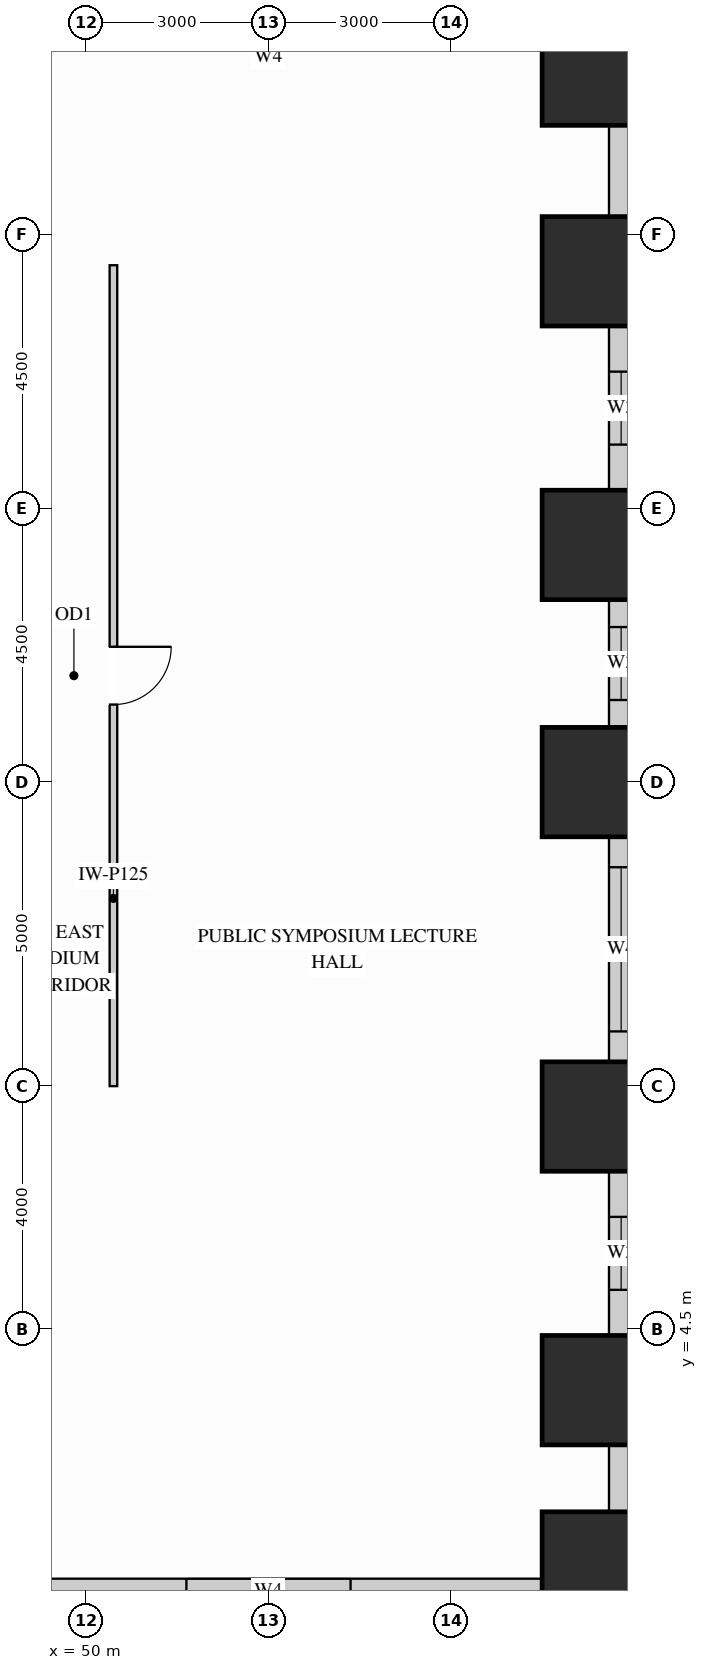
"""IFC4 building model, lengths in metres.
Left out: names, types, materials, properties, quantities, classifications, styles, units other than length and angle.
Written with IfcOpenShell. Run it as: python <this file> out.ifc"""

import sys

from ifc_helpers import new_model, si_unit, direction, frame, frame_2d, origin, origin_2d, place, context, subcontext, project, spatial, rectangle, extrude, source, transform, mapped, element, fill, save


model = new_model("IFC4")
c1 = context("Model", 3, precision=1e-05, world=origin(), true_north=direction((0.0, 1.0)))
c2 = subcontext(c1, "Body", "Model", "MODEL_VIEW")
j1 = project(units=[si_unit("LENGTHUNIT", "METRE"), si_unit("PLANEANGLEUNIT", "RADIAN")], contexts=[c1])
p1 = place(None, origin())
s1 = spatial("IfcSite", under=j1, at=p1, CompositionType="ELEMENT")
p2 = place(p1, origin())
s2 = spatial("IfcBuilding", under=s1, at=p2, CompositionType="ELEMENT")
p3 = place(p2, frame((0.0, 0.0, 4.5)))
s3 = spatial("IfcBuildingStorey", under=s2, at=p3, CompositionType="ELEMENT", Elevation=4.5)
m1 = source(origin(), c2, "Body", "SweptSolid", [
    extrude(rectangle(XDim=1.8, YDim=1.8, at=origin_2d()), origin(), (0.0, 0.0, 1.0), 4.25),
])
for number, where, z_axis, x_axis in (
    (1, (58.4, 0.6, 0.0), (0.0, 0.0, 1.0), (1.0, 0.0, 0.0)),
    (2, (58.4, 3.5, 0.0), (0.0, 0.0, 1.0), (1.0, 0.0, 0.0)),
    (3, (58.4, 8.0, 0.0), (0.0, 0.0, 1.0), (1.0, 0.0, 0.0)),
    (4, (58.4, 13.5, 0.0), (0.0, 0.0, 1.0), (1.0, 0.0, 0.0)),
    (5, (58.4, 17.4, 0.0), (0.0, 0.0, 1.0), (1.0, 0.0, 0.0)),
    (6, (58.4, 21.9, 0.0), (0.0, 0.0, 1.0), (1.0, 0.0, 0.0)),
    (7, (58.4, 25.2, 0.0), (0.0, 0.0, 1.0), (1.0, 0.0, 0.0)),
):
    element("IfcColumn", number, at=place(p3, frame(where, z_axis=z_axis, x_axis=x_axis)), inside=s3, PredefinedType="COLUMN", context=c2, shape_type="MappedRepresentation", body=[
        mapped(m1, transform((0.0, 0.0, 0.0), x_axis=(1.0, 0.0, 0.0), y_axis=(0.0, 1.0, 0.0), z_axis=(0.0, 0.0, 1.0))),
    ])
p4 = place(p3, frame((48.498, 0.2, 0.0), z_axis=(0.0, 0.0, 1.0), x_axis=(1.0, 0.0, 0.0)))
e8 = element("IfcWall", 8, at=p4, inside=s3, PredefinedType="SOLIDWALL", context=c2, shape_type="SweptSolid", body=[
    extrude(rectangle(XDim=9.004, YDim=0.4, at=frame_2d((4.502, 0.0))), origin(), (0.0, 0.0, 1.0), 3.135),
])
p5 = place(p4, frame((3.152, 0.0, 0.65)))
e9 = element("IfcOpeningElement", 9, at=p5, cuts=e8, PredefinedType="OPENING", context=c2, shape_type="SweptSolid", body=[
    extrude(rectangle(XDim=2.7, YDim=2.305, at=frame_2d((1.35, 1.152))), frame((0.0, 0.21, 0.0), z_axis=(0.0, -1.0, 0.0), x_axis=(1.0, 0.0, 0.0)), (0.0, 0.0, 1.0), 0.42),
])
m2 = source(origin(), c2, "Body", "SweptSolid", [
    extrude(rectangle(XDim=1.104, YDim=0.4, at=frame_2d((0.552, 0.0))), origin(), (0.0, 0.0, 1.0), 3.135),
])
p6 = place(p3, frame((58.8, 1.498, 0.0), z_axis=(0.0, 0.0, 1.0), x_axis=(0.0, 1.0, 0.0)))
e10 = element("IfcWall", 10, at=p6, inside=s3, PredefinedType="SOLIDWALL", context=c2, shape_type="MappedRepresentation", body=[
    mapped(m2, transform((0.0, 0.0, 0.0), x_axis=(1.0, 0.0, 0.0), y_axis=(0.0, 1.0, 0.0), z_axis=(0.0, 0.0, 1.0))),
])
p7 = place(p3, frame((58.8, 4.398, 0.0), z_axis=(0.0, 0.0, 1.0), x_axis=(0.0, 1.0, 0.0)))
e11 = element("IfcWall", 11, at=p7, inside=s3, PredefinedType="SOLIDWALL", context=c2, shape_type="SweptSolid", body=[
    extrude(rectangle(XDim=2.704, YDim=0.4, at=frame_2d((1.352, 0.0))), origin(), (0.0, 0.0, 1.0), 3.135),
])
p8 = place(p7, frame((0.752, 0.0, 0.65)))
e12 = element("IfcOpeningElement", 12, at=p8, cuts=e11, PredefinedType="OPENING", context=c2, shape_type="SweptSolid", body=[
    extrude(rectangle(XDim=1.2, YDim=2.305, at=frame_2d((0.6, 1.152))), frame((0.0, 0.21, 0.0), z_axis=(0.0, -1.0, 0.0), x_axis=(1.0, 0.0, 0.0)), (0.0, 0.0, 1.0), 0.42),
])
p9 = place(p3, frame((58.8, 8.898, 0.0), z_axis=(0.0, 0.0, 1.0), x_axis=(0.0, 1.0, 0.0)))
e13 = element("IfcWall", 13, at=p9, inside=s3, PredefinedType="SOLIDWALL", context=c2, shape_type="SweptSolid", body=[
    extrude(rectangle(XDim=3.704, YDim=0.4, at=frame_2d((1.852, 0.0))), origin(), (0.0, 0.0, 1.0), 3.135),
])
p10 = place(p9, frame((0.502, 0.0, 0.65)))
e14 = element("IfcOpeningElement", 14, at=p10, cuts=e13, PredefinedType="OPENING", context=c2, shape_type="SweptSolid", body=[
    extrude(rectangle(XDim=2.7, YDim=2.305, at=frame_2d((1.35, 1.152))), frame((0.0, 0.21, 0.0), z_axis=(0.0, -1.0, 0.0), x_axis=(1.0, 0.0, 0.0)), (0.0, 0.0, 1.0), 0.42),
])
p11 = place(p3, frame((58.8, 14.398, 0.0), z_axis=(0.0, 0.0, 1.0), x_axis=(0.0, 1.0, 0.0)))
e15 = element("IfcWall", 15, at=p11, inside=s3, PredefinedType="SOLIDWALL", context=c2, shape_type="SweptSolid", body=[
    extrude(rectangle(XDim=2.104, YDim=0.4, at=frame_2d((1.052, 0.0))), origin(), (0.0, 0.0, 1.0), 3.135),
])
p12 = place(p11, frame((0.452, 0.0, 0.65)))
e16 = element("IfcOpeningElement", 16, at=p12, cuts=e15, PredefinedType="OPENING", context=c2, shape_type="SweptSolid", body=[
    extrude(rectangle(XDim=1.2, YDim=2.305, at=frame_2d((0.6, 1.152))), frame((0.0, 0.21, 0.0), z_axis=(0.0, -1.0, 0.0), x_axis=(1.0, 0.0, 0.0)), (0.0, 0.0, 1.0), 0.42),
])
p13 = place(p3, frame((58.8, 18.298, 0.0), z_axis=(0.0, 0.0, 1.0), x_axis=(0.0, 1.0, 0.0)))
e17 = element("IfcWall", 17, at=p13, inside=s3, PredefinedType="SOLIDWALL", context=c2, shape_type="SweptSolid", body=[
    extrude(rectangle(XDim=2.704, YDim=0.4, at=frame_2d((1.352, 0.0))), origin(), (0.0, 0.0, 1.0), 3.135),
])
p14 = place(p13, frame((0.752, 0.0, 0.65)))
e18 = element("IfcOpeningElement", 18, at=p14, cuts=e17, PredefinedType="OPENING", context=c2, shape_type="SweptSolid", body=[
    extrude(rectangle(XDim=1.2, YDim=2.305, at=frame_2d((0.6, 1.152))), frame((0.0, 0.21, 0.0), z_axis=(0.0, -1.0, 0.0), x_axis=(1.0, 0.0, 0.0)), (0.0, 0.0, 1.0), 0.42),
])
m3 = source(origin(), c2, "Body", "SweptSolid", [
    extrude(rectangle(XDim=1.504, YDim=0.4, at=frame_2d((0.752, 0.0))), origin(), (0.0, 0.0, 1.0), 3.135),
])
p15 = place(p3, frame((58.8, 22.798, 0.0), z_axis=(0.0, 0.0, 1.0), x_axis=(0.0, 1.0, 0.0)))
e19 = element("IfcWall", 19, at=p15, inside=s3, PredefinedType="SOLIDWALL", context=c2, shape_type="MappedRepresentation", body=[
    mapped(m3, transform((0.0, 0.0, 0.0), x_axis=(1.0, 0.0, 0.0), y_axis=(0.0, 1.0, 0.0), z_axis=(0.0, 0.0, 1.0))),
])
p16 = place(p3, frame((50.45, 8.5, 0.0), z_axis=(0.0, 0.0, 1.0), x_axis=(0.0, 1.0, 0.0)))
e20 = element("IfcWall", 20, at=p16, inside=s3, PredefinedType="PARTITIONING", context=c2, shape_type="SweptSolid", body=[
    extrude(rectangle(XDim=13.5, YDim=0.125, at=frame_2d((6.75, 0.0))), origin(), (0.0, 0.0, 1.0), 4.235),
])
p17 = place(p16, frame((6.275, 0.0, 0.0)))
e21 = element("IfcOpeningElement", 21, at=p17, cuts=e20, PredefinedType="OPENING", context=c2, shape_type="SweptSolid", body=[
    extrude(rectangle(XDim=0.95, YDim=2.15, at=frame_2d((0.475, 1.075))), frame((0.0, 0.073, 0.0), z_axis=(0.0, -1.0, 0.0), x_axis=(1.0, 0.0, 0.0)), (0.0, 0.0, 1.0), 0.145),
])
m4 = source(origin(), c2, "Body", "SweptSolid", [
    extrude(rectangle(XDim=0.95, YDim=2.15, at=frame_2d((0.475, 1.075))), frame((0.0, 0.025, 0.0), z_axis=(0.0, -1.0, 0.0), x_axis=(1.0, 0.0, 0.0)), (0.0, 0.0, 1.0), 0.05),
])
p18 = place(p17, origin())
e22 = element("IfcDoor", 22, at=p18, inside=s3, OperationType="SINGLE_SWING_RIGHT", PredefinedType="DOOR", context=c2, shape_type="MappedRepresentation", body=[
    mapped(m4, transform((0.0, 0.0, 0.0), x_axis=(1.0, 0.0, 0.0), y_axis=(0.0, 1.0, 0.0), z_axis=(0.0, 0.0, 1.0))),
])
fill(e21, e22)
m5 = source(origin(), c2, "Body", "SweptSolid", [
    extrude(rectangle(XDim=1.2, YDim=2.305, at=frame_2d((0.6, 1.152))), frame((0.0, 0.03, 0.0), z_axis=(0.0, -1.0, 0.0), x_axis=(1.0, 0.0, 0.0)), (0.0, 0.0, 1.0), 0.06),
])
p19 = place(p8, origin())
e23 = element("IfcWindow", 23, at=p19, inside=s3, PartitioningType="SINGLE_PANEL", PredefinedType="WINDOW", context=c2, shape_type="MappedRepresentation", body=[
    mapped(m5, transform((0.0, 0.0, 0.0), x_axis=(1.0, 0.0, 0.0), y_axis=(0.0, 1.0, 0.0), z_axis=(0.0, 0.0, 1.0))),
])
fill(e12, e23)
p20 = place(p12, origin())
e24 = element("IfcWindow", 24, at=p20, inside=s3, PartitioningType="SINGLE_PANEL", PredefinedType="WINDOW", context=c2, shape_type="MappedRepresentation", body=[
    mapped(m5, transform((0.0, 0.0, 0.0), x_axis=(1.0, 0.0, 0.0), y_axis=(0.0, 1.0, 0.0), z_axis=(0.0, 0.0, 1.0))),
])
fill(e16, e24)
p21 = place(p14, origin())
e25 = element("IfcWindow", 25, at=p21, inside=s3, PartitioningType="SINGLE_PANEL", PredefinedType="WINDOW", context=c2, shape_type="MappedRepresentation", body=[
    mapped(m5, transform((0.0, 0.0, 0.0), x_axis=(1.0, 0.0, 0.0), y_axis=(0.0, 1.0, 0.0), z_axis=(0.0, 0.0, 1.0))),
])
fill(e18, e25)
m6 = source(origin(), c2, "Body", "SweptSolid", [
    extrude(rectangle(XDim=2.7, YDim=2.305, at=frame_2d((1.35, 1.152))), frame((0.0, 0.03, 0.0), z_axis=(0.0, -1.0, 0.0), x_axis=(1.0, 0.0, 0.0)), (0.0, 0.0, 1.0), 0.06),
])
p22 = place(p5, origin())
e26 = element("IfcWindow", 26, at=p22, inside=s3, PartitioningType="SINGLE_PANEL", PredefinedType="WINDOW", context=c2, shape_type="MappedRepresentation", body=[
    mapped(m6, transform((0.0, 0.0, 0.0), x_axis=(1.0, 0.0, 0.0), y_axis=(0.0, 1.0, 0.0), z_axis=(0.0, 0.0, 1.0))),
])
fill(e9, e26)
p23 = place(p10, origin())
e27 = element("IfcWindow", 27, at=p23, inside=s3, PartitioningType="SINGLE_PANEL", PredefinedType="WINDOW", context=c2, shape_type="MappedRepresentation", body=[
    mapped(m6, transform((0.0, 0.0, 0.0), x_axis=(1.0, 0.0, 0.0), y_axis=(0.0, 1.0, 0.0), z_axis=(0.0, 0.0, 1.0))),
])
fill(e14, e27)
save(model, sys.argv[1])
